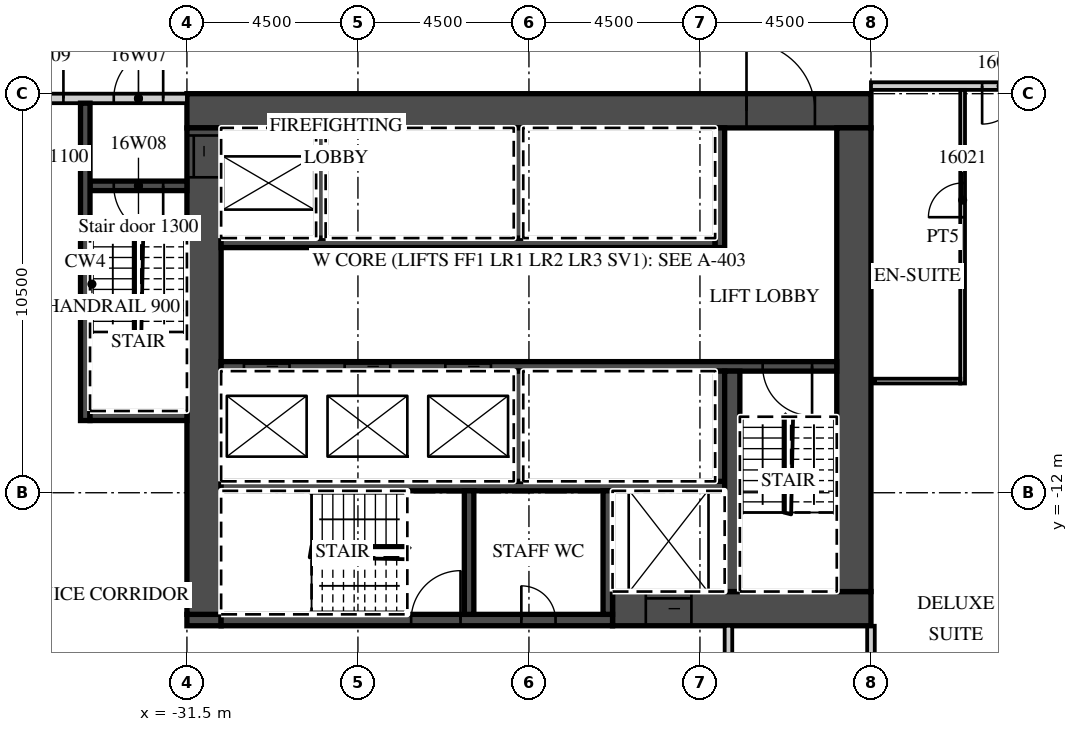
"""IFC4 building model, lengths in metres.
Left out: names, types, materials, properties, quantities, classifications, styles, units other than length and angle.
Written with IfcOpenShell. Run it as: python <this file> out.ifc"""

import sys

from ifc_helpers import new_model, si_unit, direction, frame, frame_2d, origin, place, context, subcontext, project, spatial, rectangle, extrude, element, fill, save


model = new_model("IFC4")
c1 = context("Model", 3, precision=1e-05, world=origin(), true_north=direction((0.0, 1.0)))
c2 = subcontext(c1, "Body", "Model", "MODEL_VIEW")
j1 = project(units=[si_unit("LENGTHUNIT", "METRE"), si_unit("PLANEANGLEUNIT", "RADIAN")], contexts=[c1])
p1 = place(None, origin())
s1 = spatial("IfcSite", under=j1, at=p1, CompositionType="ELEMENT")
p2 = place(p1, origin())
s2 = spatial("IfcBuilding", under=s1, at=p2, CompositionType="ELEMENT")
p3 = place(p2, frame((0.0, 0.0, 83.1)))
s3 = spatial("IfcBuildingStorey", under=s2, at=p3, CompositionType="ELEMENT", Elevation=83.1)
p4 = place(p3, frame((-13.5, -21.55, 0.0), z_axis=(0.0, 0.0, 1.0), x_axis=(0.0, 1.0, 0.0)))
e1 = element("IfcWall", 1, at=p4, inside=s3, PredefinedType="PARTITIONING", context=c2, shape_type="SweptSolid", body=[
    extrude(rectangle(XDim=6.05, YDim=0.2, at=frame_2d((3.025, 0.0))), origin(), (0.0, 0.0, 1.0), 3.02),
])
p5 = place(p3, frame((-13.5, -1.3, 0.0), z_axis=(0.0, 0.0, 1.0), x_axis=(1.0, 0.0, 0.0)))
e2 = element("IfcWall", 2, at=p5, inside=s3, PredefinedType="PARTITIONING", context=c2, shape_type="SweptSolid", body=[
    extrude(rectangle(XDim=58.05, YDim=0.2, at=frame_2d((29.025, 0.0))), origin(), (0.0, 0.0, 1.0), 3.02),
])
p6 = place(p5, frame((2.925, 0.0, 0.0)))
e3 = element("IfcOpeningElement", 3, at=p6, cuts=e2, PredefinedType="OPENING", context=c2, shape_type="SweptSolid", body=[
    extrude(rectangle(XDim=1.0, YDim=2.1, at=frame_2d((0.5, 1.05))), frame((0.0, 0.11, 0.0), z_axis=(0.0, -1.0, 0.0), x_axis=(1.0, 0.0, 0.0)), (0.0, 0.0, 1.0), 0.22),
])
p7 = place(p5, frame((7.45, 0.0, 0.0)))
e4 = element("IfcOpeningElement", 4, at=p7, cuts=e2, PredefinedType="OPENING", context=c2, shape_type="SweptSolid", body=[
    extrude(rectangle(XDim=1.0, YDim=2.1, at=frame_2d((0.5, 1.05))), frame((0.0, 0.11, 0.0), z_axis=(0.0, -1.0, 0.0), x_axis=(1.0, 0.0, 0.0)), (0.0, 0.0, 1.0), 0.22),
])
p8 = place(p5, frame((11.925, 0.0, 0.0)))
e5 = element("IfcOpeningElement", 5, at=p8, cuts=e2, PredefinedType="OPENING", context=c2, shape_type="SweptSolid", body=[
    extrude(rectangle(XDim=1.0, YDim=2.1, at=frame_2d((0.5, 1.05))), frame((0.0, 0.11, 0.0), z_axis=(0.0, -1.0, 0.0), x_axis=(1.0, 0.0, 0.0)), (0.0, 0.0, 1.0), 0.22),
])
p9 = place(p5, frame((15.938, 0.0, 0.0)))
e6 = element("IfcOpeningElement", 6, at=p9, cuts=e2, PredefinedType="OPENING", context=c2, shape_type="SweptSolid", body=[
    extrude(rectangle(XDim=1.2, YDim=2.1, at=frame_2d((0.6, 1.05))), frame((0.0, 0.11, 0.0), z_axis=(0.0, -1.0, 0.0), x_axis=(1.0, 0.0, 0.0)), (0.0, 0.0, 1.0), 0.22),
])
p10 = place(p5, frame((25.45, 0.0, 0.0)))
e7 = element("IfcOpeningElement", 7, at=p10, cuts=e2, PredefinedType="OPENING", context=c2, shape_type="SweptSolid", body=[
    extrude(rectangle(XDim=1.0, YDim=2.1, at=frame_2d((0.5, 1.05))), frame((0.0, 0.11, 0.0), z_axis=(0.0, -1.0, 0.0), x_axis=(1.0, 0.0, 0.0)), (0.0, 0.0, 1.0), 0.22),
])
p11 = place(p5, frame((29.925, 0.0, 0.0)))
e8 = element("IfcOpeningElement", 8, at=p11, cuts=e2, PredefinedType="OPENING", context=c2, shape_type="SweptSolid", body=[
    extrude(rectangle(XDim=1.0, YDim=2.1, at=frame_2d((0.5, 1.05))), frame((0.0, 0.11, 0.0), z_axis=(0.0, -1.0, 0.0), x_axis=(1.0, 0.0, 0.0)), (0.0, 0.0, 1.0), 0.22),
])
p12 = place(p5, frame((36.862, 0.0, 0.0)))
e9 = element("IfcOpeningElement", 9, at=p12, cuts=e2, PredefinedType="OPENING", context=c2, shape_type="SweptSolid", body=[
    extrude(rectangle(XDim=1.2, YDim=2.1, at=frame_2d((0.6, 1.05))), frame((0.0, 0.11, 0.0), z_axis=(0.0, -1.0, 0.0), x_axis=(1.0, 0.0, 0.0)), (0.0, 0.0, 1.0), 0.22),
])
p13 = place(p5, frame((41.075, 0.0, 0.0)))
e10 = element("IfcOpeningElement", 10, at=p13, cuts=e2, PredefinedType="OPENING", context=c2, shape_type="SweptSolid", body=[
    extrude(rectangle(XDim=1.0, YDim=2.1, at=frame_2d((0.5, 1.05))), frame((0.0, 0.11, 0.0), z_axis=(0.0, -1.0, 0.0), x_axis=(1.0, 0.0, 0.0)), (0.0, 0.0, 1.0), 0.22),
])
p14 = place(p5, frame((45.55, 0.0, 0.0)))
e11 = element("IfcOpeningElement", 11, at=p14, cuts=e2, PredefinedType="OPENING", context=c2, shape_type="SweptSolid", body=[
    extrude(rectangle(XDim=1.0, YDim=2.1, at=frame_2d((0.5, 1.05))), frame((0.0, 0.11, 0.0), z_axis=(0.0, -1.0, 0.0), x_axis=(1.0, 0.0, 0.0)), (0.0, 0.0, 1.0), 0.22),
])
p15 = place(p5, frame((52.425, 0.0, 0.0)))
e12 = element("IfcOpeningElement", 12, at=p15, cuts=e2, PredefinedType="OPENING", context=c2, shape_type="SweptSolid", body=[
    extrude(rectangle(XDim=1.0, YDim=2.1, at=frame_2d((0.5, 1.05))), frame((0.0, 0.11, 0.0), z_axis=(0.0, -1.0, 0.0), x_axis=(1.0, 0.0, 0.0)), (0.0, 0.0, 1.0), 0.22),
])
p16 = place(p5, frame((56.525, 0.0, 0.0)))
e13 = element("IfcOpeningElement", 13, at=p16, cuts=e2, PredefinedType="OPENING", context=c2, shape_type="SweptSolid", body=[
    extrude(rectangle(XDim=1.0, YDim=2.1, at=frame_2d((0.5, 1.05))), frame((0.0, 0.11, 0.0), z_axis=(0.0, -1.0, 0.0), x_axis=(1.0, 0.0, 0.0)), (0.0, 0.0, 1.0), 0.22),
])
p17 = place(p3, frame((-11.088, -9.125, 0.0), z_axis=(0.0, 0.0, 1.0), x_axis=(0.0, 1.0, 0.0)))
e14 = element("IfcWall", 14, at=p17, inside=s3, PredefinedType="PARTITIONING", context=c2, shape_type="SweptSolid", body=[
    extrude(rectangle(XDim=7.725, YDim=0.125, at=frame_2d((3.863, 0.0))), origin(), (0.0, 0.0, 1.0), 3.02),
])
p18 = place(p17, frame((4.375, 0.0, 0.0)))
e15 = element("IfcOpeningElement", 15, at=p18, cuts=e14, PredefinedType="OPENING", context=c2, shape_type="SweptSolid", body=[
    extrude(rectangle(XDim=0.9, YDim=2.1, at=frame_2d((0.45, 1.05))), frame((0.0, 0.073, 0.0), z_axis=(0.0, -1.0, 0.0), x_axis=(1.0, 0.0, 0.0)), (0.0, 0.0, 1.0), 0.145),
])
p19 = place(p3, frame((-13.4, -9.062, 0.0), z_axis=(0.0, 0.0, 1.0), x_axis=(1.0, 0.0, 0.0)))
e16 = element("IfcWall", 16, at=p19, inside=s3, PredefinedType="PARTITIONING", context=c2, shape_type="SweptSolid", body=[
    extrude(rectangle(XDim=2.25, YDim=0.125, at=frame_2d((1.125, 0.0))), origin(), (0.0, 0.0, 1.0), 3.02),
])
p20 = place(p3, frame((-31.5, -1.95, 0.0), z_axis=(0.0, 0.0, 1.0), x_axis=(1.0, 0.0, 0.0)))
e17 = element("IfcWall", 17, at=p20, inside=s3, PredefinedType="SHEAR", context=c2, shape_type="SweptSolid", body=[
    extrude(rectangle(XDim=18.0, YDim=0.9, at=frame_2d((9.0, 0.0))), origin(), (0.0, 0.0, 1.0), 3.02),
])
p21 = place(p20, frame((14.725, 0.0, 0.0)))
e18 = element("IfcOpeningElement", 18, at=p21, cuts=e17, PredefinedType="OPENING", context=c2, shape_type="SweptSolid", body=[
    extrude(rectangle(XDim=1.8, YDim=2.1, at=frame_2d((0.9, 1.05))), frame((0.0, 0.46, 0.0), z_axis=(0.0, -1.0, 0.0), x_axis=(1.0, 0.0, 0.0)), (0.0, 0.0, 1.0), 0.92),
])
p22 = place(p3, frame((-20.3, -15.05, 0.0), z_axis=(0.0, 0.0, 1.0), x_axis=(1.0, 0.0, 0.0)))
e19 = element("IfcWall", 19, at=p22, inside=s3, PredefinedType="SHEAR", context=c2, shape_type="SweptSolid", body=[
    extrude(rectangle(XDim=6.8, YDim=0.9, at=frame_2d((3.4, 0.0))), origin(), (0.0, 0.0, 1.0), 3.02),
])
p23 = place(p22, frame((0.875, 0.0, 0.0)))
e20 = element("IfcOpeningElement", 20, at=p23, cuts=e19, PredefinedType="OPENING", context=c2, shape_type="SweptSolid", body=[
    extrude(rectangle(XDim=1.2, YDim=2.1, at=frame_2d((0.6, 1.05))), frame((0.0, 0.46, 0.0), z_axis=(0.0, -1.0, 0.0), x_axis=(1.0, 0.0, 0.0)), (0.0, 0.0, 1.0), 0.92),
])
p24 = place(p3, frame((-31.5, -15.35, 0.0), z_axis=(0.0, 0.0, 1.0), x_axis=(1.0, 0.0, 0.0)))
e21 = element("IfcWall", 21, at=p24, inside=s3, PredefinedType="SHEAR", context=c2, shape_type="SweptSolid", body=[
    extrude(rectangle(XDim=0.9, YDim=0.3, at=frame_2d((0.45, 0.0))), origin(), (0.0, 0.0, 1.0), 3.02),
])
p25 = place(p3, frame((-30.6, -15.35, 0.0), z_axis=(0.0, 0.0, 1.0), x_axis=(1.0, 0.0, 0.0)))
e22 = element("IfcWall", 22, at=p25, inside=s3, PredefinedType="SHEAR", context=c2, shape_type="SweptSolid", body=[
    extrude(rectangle(XDim=10.3, YDim=0.3, at=frame_2d((5.15, 0.0))), origin(), (0.0, 0.0, 1.0), 3.02),
])
p26 = place(p25, frame((5.0, 0.0, 0.0)))
e23 = element("IfcOpeningElement", 23, at=p26, cuts=e22, PredefinedType="OPENING", context=c2, shape_type="SweptSolid", body=[
    extrude(rectangle(XDim=1.3, YDim=2.1, at=frame_2d((0.65, 1.05))), frame((0.0, 0.16, 0.0), z_axis=(0.0, -1.0, 0.0), x_axis=(1.0, 0.0, 0.0)), (0.0, 0.0, 1.0), 0.32),
])
p27 = place(p25, frame((7.9, 0.0, 0.0)))
e24 = element("IfcOpeningElement", 24, at=p27, cuts=e22, PredefinedType="OPENING", context=c2, shape_type="SweptSolid", body=[
    extrude(rectangle(XDim=0.9, YDim=2.1, at=frame_2d((0.45, 1.05))), frame((0.0, 0.16, 0.0), z_axis=(0.0, -1.0, 0.0), x_axis=(1.0, 0.0, 0.0)), (0.0, 0.0, 1.0), 0.32),
])
p28 = place(p3, frame((-31.05, -15.2, 0.0), z_axis=(0.0, 0.0, 1.0), x_axis=(0.0, 1.0, 0.0)))
e25 = element("IfcWall", 25, at=p28, inside=s3, PredefinedType="SHEAR", context=c2, shape_type="SweptSolid", body=[
    extrude(rectangle(XDim=12.8, YDim=0.9, at=frame_2d((6.4, 0.0))), origin(), (0.0, 0.0, 1.0), 3.02),
])
p29 = place(p28, frame((11.5, 0.0, 0.0)))
e26 = element("IfcOpeningElement", 26, at=p29, cuts=e25, PredefinedType="OPENING", context=c2, shape_type="SweptSolid", body=[
    extrude(rectangle(XDim=1.1, YDim=2.1, at=frame_2d((0.55, 1.05))), frame((0.0, 0.46, 0.0), z_axis=(0.0, -1.0, 0.0), x_axis=(1.0, 0.0, 0.0)), (0.0, 0.0, 1.0), 0.92),
])
p30 = place(p3, frame((-13.95, -14.6, 0.0), z_axis=(0.0, 0.0, 1.0), x_axis=(0.0, 1.0, 0.0)))
e27 = element("IfcWall", 27, at=p30, inside=s3, PredefinedType="SHEAR", context=c2, shape_type="SweptSolid", body=[
    extrude(rectangle(XDim=12.2, YDim=0.9, at=frame_2d((6.1, 0.0))), origin(), (0.0, 0.0, 1.0), 3.02),
])
p31 = place(p3, frame((-30.6, -5.425, 0.0), z_axis=(0.0, 0.0, 1.0), x_axis=(1.0, 0.0, 0.0)))
e28 = element("IfcWall", 28, at=p31, inside=s3, PredefinedType="SHEAR", context=c2, shape_type="SweptSolid", body=[
    extrude(rectangle(XDim=13.0, YDim=0.25, at=frame_2d((6.5, 0.0))), origin(), (0.0, 0.0, 1.0), 3.02),
])
p32 = place(p3, frame((-17.475, -5.55, 0.0), z_axis=(0.0, 0.0, 1.0), x_axis=(0.0, 1.0, 0.0)))
e29 = element("IfcWall", 29, at=p32, inside=s3, PredefinedType="SHEAR", context=c2, shape_type="SweptSolid", body=[
    extrude(rectangle(XDim=3.15, YDim=0.25, at=frame_2d((1.575, 0.0))), origin(), (0.0, 0.0, 1.0), 3.02),
])
for number, where, z_axis, x_axis in (
    (30, (-27.975, -5.3, 0.0), (0.0, 0.0, 1.0), (0.0, 1.0, 0.0)),
    (31, (-22.775, -5.3, 0.0), (0.0, 0.0, 1.0), (0.0, 1.0, 0.0)),
):
    element("IfcWall", number, at=place(p3, frame(where, z_axis=z_axis, x_axis=x_axis)), inside=s3, PredefinedType="SHEAR", context=c2, shape_type="SweptSolid", body=[
        extrude(rectangle(XDim=2.9, YDim=0.25, at=frame_2d((1.45, 0.0))), origin(), (0.0, 0.0, 1.0), 3.02),
    ])
p33 = place(p3, frame((-30.6, -8.675, 0.0), z_axis=(0.0, 0.0, 1.0), x_axis=(1.0, 0.0, 0.0)))
e32 = element("IfcWall", 32, at=p33, inside=s3, PredefinedType="SHEAR", context=c2, shape_type="SweptSolid", body=[
    extrude(rectangle(XDim=16.2, YDim=0.25, at=frame_2d((8.1, 0.0))), origin(), (0.0, 0.0, 1.0), 3.02),
])
p34 = place(p33, frame((0.6, 0.0, 0.0)))
e33 = element("IfcOpeningElement", 33, at=p34, cuts=e32, PredefinedType="OPENING", context=c2, shape_type="SweptSolid", body=[
    extrude(rectangle(XDim=1.2, YDim=2.1, at=frame_2d((0.6, 1.05))), frame((0.0, 0.135, 0.0), z_axis=(0.0, -1.0, 0.0), x_axis=(1.0, 0.0, 0.0)), (0.0, 0.0, 1.0), 0.27),
])
p35 = place(p33, frame((3.25, 0.0, 0.0)))
e34 = element("IfcOpeningElement", 34, at=p35, cuts=e32, PredefinedType="OPENING", context=c2, shape_type="SweptSolid", body=[
    extrude(rectangle(XDim=1.2, YDim=2.1, at=frame_2d((0.6, 1.05))), frame((0.0, 0.135, 0.0), z_axis=(0.0, -1.0, 0.0), x_axis=(1.0, 0.0, 0.0)), (0.0, 0.0, 1.0), 0.27),
])
p36 = place(p33, frame((5.9, 0.0, 0.0)))
e35 = element("IfcOpeningElement", 35, at=p36, cuts=e32, PredefinedType="OPENING", context=c2, shape_type="SweptSolid", body=[
    extrude(rectangle(XDim=1.2, YDim=2.1, at=frame_2d((0.6, 1.05))), frame((0.0, 0.135, 0.0), z_axis=(0.0, -1.0, 0.0), x_axis=(1.0, 0.0, 0.0)), (0.0, 0.0, 1.0), 0.27),
])
p37 = place(p33, frame((14.25, 0.0, 0.0)))
e36 = element("IfcOpeningElement", 36, at=p37, cuts=e32, PredefinedType="OPENING", context=c2, shape_type="SweptSolid", body=[
    extrude(rectangle(XDim=1.3, YDim=2.1, at=frame_2d((0.65, 1.05))), frame((0.0, 0.135, 0.0), z_axis=(0.0, -1.0, 0.0), x_axis=(1.0, 0.0, 0.0)), (0.0, 0.0, 1.0), 0.27),
])
p38 = place(p3, frame((-30.6, -11.825, 0.0), z_axis=(0.0, 0.0, 1.0), x_axis=(1.0, 0.0, 0.0)))
e37 = element("IfcWall", 37, at=p38, inside=s3, PredefinedType="SHEAR", context=c2, shape_type="SweptSolid", body=[
    extrude(rectangle(XDim=13.25, YDim=0.25, at=frame_2d((6.625, 0.0))), origin(), (0.0, 0.0, 1.0), 3.02),
])
for number, where, z_axis, x_axis in (
    (38, (-17.475, -11.7, 0.0), (0.0, 0.0, 1.0), (0.0, 1.0, 0.0)),
    (39, (-22.775, -11.7, 0.0), (0.0, 0.0, 1.0), (0.0, 1.0, 0.0)),
):
    element("IfcWall", number, at=place(p3, frame(where, z_axis=z_axis, x_axis=x_axis)), inside=s3, PredefinedType="SHEAR", context=c2, shape_type="SweptSolid", body=[
        extrude(rectangle(XDim=2.9, YDim=0.25, at=frame_2d((1.45, 0.0))), origin(), (0.0, 0.0, 1.0), 3.02),
    ])
p39 = place(p3, frame((-17.15, -14.6, 0.0), z_axis=(0.0, 0.0, 1.0), x_axis=(0.0, 1.0, 0.0)))
e40 = element("IfcWall", 40, at=p39, inside=s3, PredefinedType="SHEAR", context=c2, shape_type="SweptSolid", body=[
    extrude(rectangle(XDim=5.8, YDim=0.4, at=frame_2d((2.9, 0.0))), origin(), (0.0, 0.0, 1.0), 3.02),
])
for number, where, z_axis, x_axis in (
    (41, (-20.425, -15.2, 0.0), (0.0, 0.0, 1.0), (0.0, 1.0, 0.0)),
    (42, (-24.075, -15.2, 0.0), (0.0, 0.0, 1.0), (0.0, 1.0, 0.0)),
):
    element("IfcWall", number, at=place(p3, frame(where, z_axis=z_axis, x_axis=x_axis)), inside=s3, PredefinedType="SHEAR", context=c2, shape_type="SweptSolid", body=[
        extrude(rectangle(XDim=3.25, YDim=0.25, at=frame_2d((1.625, 0.0))), origin(), (0.0, 0.0, 1.0), 3.02),
    ])
p40 = place(p3, frame((-44.55, -1.625, 0.0), z_axis=(0.0, 0.0, 1.0), x_axis=(1.0, 0.0, 0.0)))
e43 = element("IfcWall", 43, at=p40, inside=s3, PredefinedType="PARTITIONING", context=c2, shape_type="SweptSolid", body=[
    extrude(rectangle(XDim=13.05, YDim=0.25, at=frame_2d((6.525, 0.0))), origin(), (0.0, 0.0, 1.0), 3.02),
])
p41 = place(p40, frame((11.125, 0.0, 0.0)))
e44 = element("IfcOpeningElement", 44, at=p41, cuts=e43, PredefinedType="OPENING", context=c2, shape_type="SweptSolid", body=[
    extrude(rectangle(XDim=1.3, YDim=2.1, at=frame_2d((0.65, 1.05))), frame((0.0, 0.135, 0.0), z_axis=(0.0, -1.0, 0.0), x_axis=(1.0, 0.0, 0.0)), (0.0, 0.0, 1.0), 0.27),
])
p42 = place(p40, frame((8.7, 0.0, 0.0)))
e45 = element("IfcOpeningElement", 45, at=p42, cuts=e43, PredefinedType="OPENING", context=c2, shape_type="SweptSolid", body=[
    extrude(rectangle(XDim=1.1, YDim=2.1, at=frame_2d((0.55, 1.05))), frame((0.0, 0.135, 0.0), z_axis=(0.0, -1.0, 0.0), x_axis=(1.0, 0.0, 0.0)), (0.0, 0.0, 1.0), 0.27),
])
p43 = place(p3, frame((-34.05, -3.925, 0.0), z_axis=(0.0, 0.0, 1.0), x_axis=(1.0, 0.0, 0.0)))
e46 = element("IfcWall", 46, at=p43, inside=s3, PredefinedType="SHEAR", context=c2, shape_type="SweptSolid", body=[
    extrude(rectangle(XDim=2.55, YDim=0.25, at=frame_2d((1.275, 0.0))), origin(), (0.0, 0.0, 1.0), 3.02),
])
p44 = place(p43, frame((0.625, 0.0, 0.0)))
e47 = element("IfcOpeningElement", 47, at=p44, cuts=e46, PredefinedType="OPENING", context=c2, shape_type="SweptSolid", body=[
    extrude(rectangle(XDim=1.3, YDim=2.1, at=frame_2d((0.65, 1.05))), frame((0.0, 0.135, 0.0), z_axis=(0.0, -1.0, 0.0), x_axis=(1.0, 0.0, 0.0)), (0.0, 0.0, 1.0), 0.27),
])
p45 = place(p3, frame((-34.175, -10.1, 0.0), z_axis=(0.0, 0.0, 1.0), x_axis=(0.0, 1.0, 0.0)))
e48 = element("IfcWall", 48, at=p45, inside=s3, PredefinedType="SHEAR", context=c2, shape_type="SweptSolid", body=[
    extrude(rectangle(XDim=8.35, YDim=0.25, at=frame_2d((4.175, 0.0))), origin(), (0.0, 0.0, 1.0), 3.02),
])
p46 = place(p3, frame((-34.05, -9.975, 0.0), z_axis=(0.0, 0.0, 1.0), x_axis=(1.0, 0.0, 0.0)))
e49 = element("IfcWall", 49, at=p46, inside=s3, PredefinedType="SHEAR", context=c2, shape_type="SweptSolid", body=[
    extrude(rectangle(XDim=2.55, YDim=0.25, at=frame_2d((1.275, 0.0))), origin(), (0.0, 0.0, 1.0), 3.02),
])
p47 = place(p3, frame((-17.25, -17.7, 0.0), z_axis=(0.0, 0.0, 1.0), x_axis=(0.0, 1.0, 0.0)))
e50 = element("IfcWall", 50, at=p47, inside=s3, PredefinedType="PARTITIONING", context=c2, shape_type="SweptSolid", body=[
    extrude(rectangle(XDim=2.2, YDim=0.2, at=frame_2d((1.1, 0.0))), origin(), (0.0, 0.0, 1.0), 3.02),
])
p48 = place(p6, origin())
e51 = element("IfcDoor", 51, at=p48, inside=s3, OperationType="SINGLE_SWING_LEFT", PredefinedType="DOOR", context=c2, shape_type="SweptSolid", body=[
    extrude(rectangle(XDim=1.0, YDim=2.1, at=frame_2d((0.5, 1.05))), frame((0.0, 0.025, 0.0), z_axis=(0.0, -1.0, 0.0), x_axis=(1.0, 0.0, 0.0)), (0.0, 0.0, 1.0), 0.05),
])
fill(e3, e51)
p49 = place(p18, origin())
e52 = element("IfcDoor", 52, at=p49, inside=s3, OperationType="SINGLE_SWING_LEFT", PredefinedType="DOOR", context=c2, shape_type="SweptSolid", body=[
    extrude(rectangle(XDim=0.9, YDim=2.1, at=frame_2d((0.45, 1.05))), frame((0.0, 0.025, 0.0), z_axis=(0.0, -1.0, 0.0), x_axis=(1.0, 0.0, 0.0)), (0.0, 0.0, 1.0), 0.05),
])
fill(e15, e52)
p50 = place(p34, origin())
e53 = element("IfcDoor", 53, at=p50, inside=s3, OperationType="SLIDING_TO_LEFT", PredefinedType="DOOR", context=c2, shape_type="SweptSolid", body=[
    extrude(rectangle(XDim=1.2, YDim=2.1, at=frame_2d((0.6, 1.05))), frame((0.0, 0.025, 0.0), z_axis=(0.0, -1.0, 0.0), x_axis=(1.0, 0.0, 0.0)), (0.0, 0.0, 1.0), 0.05),
])
fill(e33, e53)
p51 = place(p35, origin())
e54 = element("IfcDoor", 54, at=p51, inside=s3, OperationType="SLIDING_TO_RIGHT", PredefinedType="DOOR", context=c2, shape_type="SweptSolid", body=[
    extrude(rectangle(XDim=1.2, YDim=2.1, at=frame_2d((0.6, 1.05))), frame((0.0, 0.025, 0.0), z_axis=(0.0, -1.0, 0.0), x_axis=(1.0, 0.0, 0.0)), (0.0, 0.0, 1.0), 0.05),
])
fill(e34, e54)
p52 = place(p36, origin())
e55 = element("IfcDoor", 55, at=p52, inside=s3, OperationType="SLIDING_TO_RIGHT", PredefinedType="DOOR", context=c2, shape_type="SweptSolid", body=[
    extrude(rectangle(XDim=1.2, YDim=2.1, at=frame_2d((0.6, 1.05))), frame((0.0, 0.025, 0.0), z_axis=(0.0, -1.0, 0.0), x_axis=(1.0, 0.0, 0.0)), (0.0, 0.0, 1.0), 0.05),
])
fill(e35, e55)
p53 = place(p23, origin())
e56 = element("IfcDoor", 56, at=p53, inside=s3, OperationType="SLIDING_TO_LEFT", PredefinedType="DOOR", context=c2, shape_type="SweptSolid", body=[
    extrude(rectangle(XDim=1.2, YDim=2.1, at=frame_2d((0.6, 1.05))), frame((0.0, 0.025, 0.0), z_axis=(0.0, -1.0, 0.0), x_axis=(1.0, 0.0, 0.0)), (0.0, 0.0, 1.0), 0.05),
])
fill(e20, e56)
p54 = place(p29, origin())
e57 = element("IfcDoor", 57, at=p54, inside=s3, OperationType="SLIDING_TO_RIGHT", PredefinedType="DOOR", context=c2, shape_type="SweptSolid", body=[
    extrude(rectangle(XDim=1.1, YDim=2.1, at=frame_2d((0.55, 1.05))), frame((0.0, 0.025, 0.0), z_axis=(0.0, -1.0, 0.0), x_axis=(1.0, 0.0, 0.0)), (0.0, 0.0, 1.0), 0.05),
])
fill(e26, e57)
p55 = place(p21, origin())
e58 = element("IfcDoor", 58, at=p55, inside=s3, OperationType="DOUBLE_DOOR_DOUBLE_SWING", PredefinedType="DOOR", context=c2, shape_type="SweptSolid", body=[
    extrude(rectangle(XDim=1.8, YDim=2.1, at=frame_2d((0.9, 1.05))), frame((0.0, 0.025, 0.0), z_axis=(0.0, -1.0, 0.0), x_axis=(1.0, 0.0, 0.0)), (0.0, 0.0, 1.0), 0.05),
])
fill(e18, e58)
p56 = place(p41, origin())
e59 = element("IfcDoor", 59, at=p56, inside=s3, OperationType="SINGLE_SWING_RIGHT", PredefinedType="DOOR", context=c2, shape_type="SweptSolid", body=[
    extrude(rectangle(XDim=1.3, YDim=2.1, at=frame_2d((0.65, 1.05))), frame((0.0, 0.025, 0.0), z_axis=(0.0, -1.0, 0.0), x_axis=(1.0, 0.0, 0.0)), (0.0, 0.0, 1.0), 0.05),
])
fill(e44, e59)
p57 = place(p44, origin())
e60 = element("IfcDoor", 60, at=p57, inside=s3, OperationType="SINGLE_SWING_RIGHT", PredefinedType="DOOR", context=c2, shape_type="SweptSolid", body=[
    extrude(rectangle(XDim=1.3, YDim=2.1, at=frame_2d((0.65, 1.05))), frame((0.0, 0.025, 0.0), z_axis=(0.0, -1.0, 0.0), x_axis=(1.0, 0.0, 0.0)), (0.0, 0.0, 1.0), 0.05),
])
fill(e47, e60)
p58 = place(p42, origin())
e61 = element("IfcDoor", 61, at=p58, inside=s3, OperationType="SINGLE_SWING_RIGHT", PredefinedType="DOOR", context=c2, shape_type="SweptSolid", body=[
    extrude(rectangle(XDim=1.1, YDim=2.1, at=frame_2d((0.55, 1.05))), frame((0.0, 0.025, 0.0), z_axis=(0.0, -1.0, 0.0), x_axis=(1.0, 0.0, 0.0)), (0.0, 0.0, 1.0), 0.05),
])
fill(e45, e61)
p59 = place(p37, origin())
e62 = element("IfcDoor", 62, at=p59, inside=s3, OperationType="SINGLE_SWING_RIGHT", PredefinedType="DOOR", context=c2, shape_type="SweptSolid", body=[
    extrude(rectangle(XDim=1.3, YDim=2.1, at=frame_2d((0.65, 1.05))), frame((0.0, 0.025, 0.0), z_axis=(0.0, -1.0, 0.0), x_axis=(1.0, 0.0, 0.0)), (0.0, 0.0, 1.0), 0.05),
])
fill(e36, e62)
p60 = place(p26, origin())
e63 = element("IfcDoor", 63, at=p60, inside=s3, OperationType="SINGLE_SWING_RIGHT", PredefinedType="DOOR", context=c2, shape_type="SweptSolid", body=[
    extrude(rectangle(XDim=1.3, YDim=2.1, at=frame_2d((0.65, 1.05))), frame((0.0, 0.025, 0.0), z_axis=(0.0, -1.0, 0.0), x_axis=(1.0, 0.0, 0.0)), (0.0, 0.0, 1.0), 0.05),
])
fill(e23, e63)
p61 = place(p27, origin())
e64 = element("IfcDoor", 64, at=p61, inside=s3, OperationType="SINGLE_SWING_LEFT", PredefinedType="DOOR", context=c2, shape_type="SweptSolid", body=[
    extrude(rectangle(XDim=0.9, YDim=2.1, at=frame_2d((0.45, 1.05))), frame((0.0, 0.025, 0.0), z_axis=(0.0, -1.0, 0.0), x_axis=(1.0, 0.0, 0.0)), (0.0, 0.0, 1.0), 0.05),
])
fill(e24, e64)
save(model, sys.argv[1])
